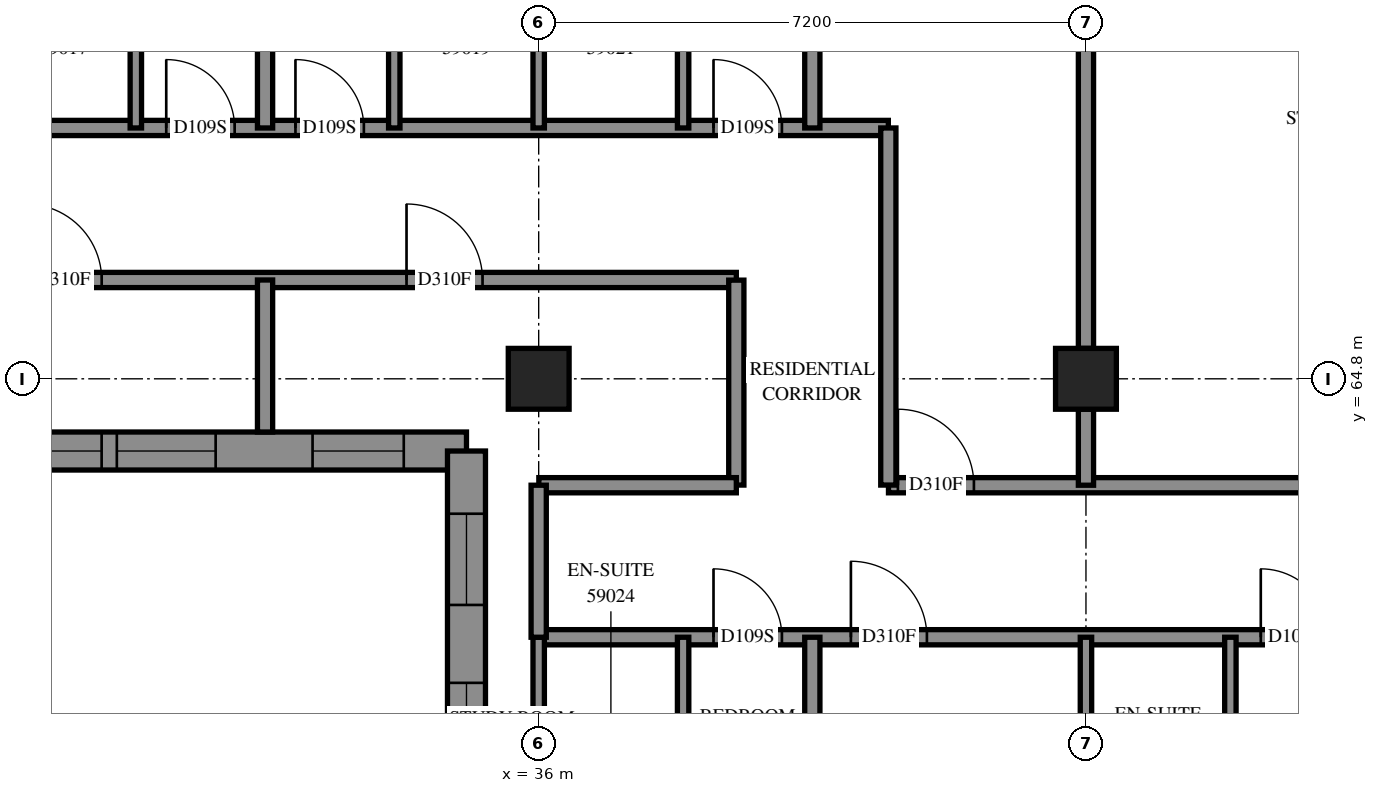
"""IFC4 building model, lengths in metres.
Left out: names, types, materials, properties, quantities, classifications, styles, units other than length and angle.
Written with IfcOpenShell. Run it as: python <this file> out.ifc"""

import sys

from ifc_helpers import new_model, si_unit, direction, frame, frame_2d, origin, origin_2d, place, context, subcontext, project, spatial, polyline, rectangle, outline, extrude, element, fill, save


model = new_model("IFC4")
c1 = context("Model", 3, precision=1e-05, world=origin(), true_north=direction((0.0, 1.0)))
c2 = subcontext(c1, "Body", "Model", "MODEL_VIEW")
j1 = project(units=[si_unit("LENGTHUNIT", "METRE"), si_unit("PLANEANGLEUNIT", "RADIAN")], contexts=[c1])
p1 = place(None, origin())
s1 = spatial("IfcSite", under=j1, at=p1, CompositionType="ELEMENT")
p2 = place(p1, origin())
s2 = spatial("IfcBuilding", under=s1, at=p2, CompositionType="ELEMENT")
p3 = place(p2, frame((0.0, 0.0, 216.8)))
s3 = spatial("IfcBuildingStorey", under=s2, at=p3, CompositionType="ELEMENT", Elevation=216.8)
for number, where, z_axis, x_axis in (
    (1, (36.0, 64.8, 0.0), (0.0, 0.0, 1.0), (1.0, 0.0, 0.0)),
    (2, (43.2, 64.8, 0.0), (0.0, 0.0, 1.0), (1.0, 0.0, 0.0)),
):
    element("IfcColumn", number, at=place(p3, frame(where, z_axis=z_axis, x_axis=x_axis)), inside=s3, PredefinedType="COLUMN", context=c2, shape_type="SweptSolid", body=[
        extrude(rectangle(XDim=0.8, YDim=0.8, at=origin_2d()), origin(), (0.0, 0.0, 1.0), 3.1),
    ])
p4 = place(p3, frame((26.708, 63.85, 0.0), z_axis=(0.0, 0.0, 1.0), x_axis=(1.0, 0.0, 0.0)))
e3 = element("IfcWall", 3, at=p4, inside=s3, PredefinedType="SOLIDWALL", context=c2, shape_type="SweptSolid", body=[
    extrude(outline(polyline([(-0.25, -0.25), (8.092, -0.25), (8.592, 0.25), (0.25, 0.25), (-0.25, -0.25)])), origin(), (0.0, 0.0, 1.0), 3.1),
])
p5 = place(p4, frame((2.242, 0.0, 0.45)))
e4 = element("IfcOpeningElement", 4, at=p5, cuts=e3, PredefinedType="OPENING", context=c2, shape_type="SweptSolid", body=[
    extrude(rectangle(XDim=1.3, YDim=2.5, at=frame_2d((0.65, 1.25))), frame((0.0, 0.26, 0.0), z_axis=(0.0, -1.0, 0.0), x_axis=(1.0, 0.0, 0.0)), (0.0, 0.0, 1.0), 0.52),
])
p6 = place(p4, frame((3.742, 0.0, 0.45)))
e5 = element("IfcOpeningElement", 5, at=p6, cuts=e3, PredefinedType="OPENING", context=c2, shape_type="SweptSolid", body=[
    extrude(rectangle(XDim=1.3, YDim=2.5, at=frame_2d((0.65, 1.25))), frame((0.0, 0.26, 0.0), z_axis=(0.0, -1.0, 0.0), x_axis=(1.0, 0.0, 0.0)), (0.0, 0.0, 1.0), 0.52),
])
p7 = place(p4, frame((0.671, 0.0, 0.45)))
e6 = element("IfcOpeningElement", 6, at=p7, cuts=e3, PredefinedType="OPENING", context=c2, shape_type="SweptSolid", body=[
    extrude(rectangle(XDim=1.2, YDim=2.5, at=frame_2d((0.6, 1.25))), frame((0.0, 0.26, 0.0), z_axis=(0.0, -1.0, 0.0), x_axis=(1.0, 0.0, 0.0)), (0.0, 0.0, 1.0), 0.52),
])
p8 = place(p4, frame((6.317, 0.0, 0.45)))
e7 = element("IfcOpeningElement", 7, at=p8, cuts=e3, PredefinedType="OPENING", context=c2, shape_type="SweptSolid", body=[
    extrude(rectangle(XDim=1.2, YDim=2.5, at=frame_2d((0.6, 1.25))), frame((0.0, 0.26, 0.0), z_axis=(0.0, -1.0, 0.0), x_axis=(1.0, 0.0, 0.0)), (0.0, 0.0, 1.0), 0.52),
])
p9 = place(p3, frame((35.05, 63.85, 0.0), z_axis=(0.0, 0.0, 1.0), x_axis=(0.0, -1.0, 0.0)))
e8 = element("IfcWall", 8, at=p9, inside=s3, PredefinedType="SOLIDWALL", context=c2, shape_type="SweptSolid", body=[
    extrude(outline(polyline([(0.25, -0.25), (7.45, -0.25), (6.95, 0.25), (-0.25, 0.25), (0.25, -0.25)])), origin(), (0.0, 0.0, 1.0), 3.1),
])
p10 = place(p9, frame((3.05, 0.0, 0.45)))
e9 = element("IfcOpeningElement", 9, at=p10, cuts=e8, PredefinedType="OPENING", context=c2, shape_type="SweptSolid", body=[
    extrude(rectangle(XDim=1.3, YDim=2.5, at=frame_2d((0.65, 1.25))), frame((0.0, 0.26, 0.0), z_axis=(0.0, -1.0, 0.0), x_axis=(1.0, 0.0, 0.0)), (0.0, 0.0, 1.0), 0.52),
])
p11 = place(p9, frame((5.0, 0.0, 0.45)))
e10 = element("IfcOpeningElement", 10, at=p11, cuts=e8, PredefinedType="OPENING", context=c2, shape_type="SweptSolid", body=[
    extrude(rectangle(XDim=1.3, YDim=2.5, at=frame_2d((0.65, 1.25))), frame((0.0, 0.26, 0.0), z_axis=(0.0, -1.0, 0.0), x_axis=(1.0, 0.0, 0.0)), (0.0, 0.0, 1.0), 0.52),
])
p12 = place(p9, frame((0.825, 0.0, 0.45)))
e11 = element("IfcOpeningElement", 11, at=p12, cuts=e8, PredefinedType="OPENING", context=c2, shape_type="SweptSolid", body=[
    extrude(rectangle(XDim=1.2, YDim=2.5, at=frame_2d((0.6, 1.25))), frame((0.0, 0.26, 0.0), z_axis=(0.0, -1.0, 0.0), x_axis=(1.0, 0.0, 0.0)), (0.0, 0.0, 1.0), 0.52),
])
p13 = place(p3, frame((36.0, 61.4, 0.0), z_axis=(0.0, 0.0, 1.0), x_axis=(1.0, 0.0, 0.0)))
e12 = element("IfcWall", 12, at=p13, inside=s3, PredefinedType="PARTITIONING", context=c2, shape_type="SweptSolid", body=[
    extrude(rectangle(XDim=17.0, YDim=0.2, at=frame_2d((8.5, 0.0))), origin(), (0.0, 0.0, 1.0), 3.1),
])
p14 = place(p13, frame((2.3, 0.0, 0.0)))
e13 = element("IfcOpeningElement", 13, at=p14, cuts=e12, PredefinedType="OPENING", context=c2, shape_type="SweptSolid", body=[
    extrude(rectangle(XDim=0.9, YDim=2.1, at=frame_2d((0.45, 1.05))), frame((0.0, 0.11, 0.0), z_axis=(0.0, -1.0, 0.0), x_axis=(1.0, 0.0, 0.0)), (0.0, 0.0, 1.0), 0.22),
])
p15 = place(p13, frame((4.107, 0.0, 0.0)))
e14 = element("IfcOpeningElement", 14, at=p15, cuts=e12, PredefinedType="OPENING", context=c2, shape_type="SweptSolid", body=[
    extrude(rectangle(XDim=1.0, YDim=2.1, at=frame_2d((0.5, 1.05))), frame((0.0, 0.11, 0.0), z_axis=(0.0, -1.0, 0.0), x_axis=(1.0, 0.0, 0.0)), (0.0, 0.0, 1.0), 0.22),
])
p16 = place(p13, frame((9.5, 0.0, 0.0)))
e15 = element("IfcOpeningElement", 15, at=p16, cuts=e12, PredefinedType="OPENING", context=c2, shape_type="SweptSolid", body=[
    extrude(rectangle(XDim=0.9, YDim=2.1, at=frame_2d((0.45, 1.05))), frame((0.0, 0.11, 0.0), z_axis=(0.0, -1.0, 0.0), x_axis=(1.0, 0.0, 0.0)), (0.0, 0.0, 1.0), 0.22),
])
p17 = place(p13, frame((11.48, 0.0, 0.0)))
e16 = element("IfcOpeningElement", 16, at=p17, cuts=e12, PredefinedType="OPENING", context=c2, shape_type="SweptSolid", body=[
    extrude(rectangle(XDim=1.0, YDim=2.1, at=frame_2d((0.5, 1.05))), frame((0.0, 0.11, 0.0), z_axis=(0.0, -1.0, 0.0), x_axis=(1.0, 0.0, 0.0)), (0.0, 0.0, 1.0), 0.22),
])
p18 = place(p13, frame((15.805, 0.0, 0.0)))
e17 = element("IfcOpeningElement", 17, at=p18, cuts=e12, PredefinedType="OPENING", context=c2, shape_type="SweptSolid", body=[
    extrude(rectangle(XDim=1.0, YDim=2.1, at=frame_2d((0.5, 1.05))), frame((0.0, 0.11, 0.0), z_axis=(0.0, -1.0, 0.0), x_axis=(1.0, 0.0, 0.0)), (0.0, 0.0, 1.0), 0.22),
])
p19 = place(p3, frame((40.602, 63.4, 0.0), z_axis=(0.0, 0.0, 1.0), x_axis=(1.0, 0.0, 0.0)))
e18 = element("IfcWall", 18, at=p19, inside=s3, PredefinedType="PARTITIONING", context=c2, shape_type="SweptSolid", body=[
    extrude(rectangle(XDim=14.398, YDim=0.2, at=frame_2d((7.199, 0.0))), origin(), (0.0, 0.0, 1.0), 3.1),
])
p20 = place(p19, frame((0.124, 0.0, 0.0)))
e19 = element("IfcOpeningElement", 19, at=p20, cuts=e18, PredefinedType="OPENING", context=c2, shape_type="SweptSolid", body=[
    extrude(rectangle(XDim=1.0, YDim=2.1, at=frame_2d((0.5, 1.05))), frame((0.0, 0.11, 0.0), z_axis=(0.0, -1.0, 0.0), x_axis=(1.0, 0.0, 0.0)), (0.0, 0.0, 1.0), 0.22),
])
p21 = place(p19, frame((6.46, 0.0, 0.0)))
e20 = element("IfcOpeningElement", 20, at=p21, cuts=e18, PredefinedType="OPENING", context=c2, shape_type="SweptSolid", body=[
    extrude(rectangle(XDim=1.0, YDim=2.1, at=frame_2d((0.5, 1.05))), frame((0.0, 0.11, 0.0), z_axis=(0.0, -1.0, 0.0), x_axis=(1.0, 0.0, 0.0)), (0.0, 0.0, 1.0), 0.22),
])
p22 = place(p19, frame((10.198, 0.0, 0.0)))
e21 = element("IfcOpeningElement", 21, at=p22, cuts=e18, PredefinedType="OPENING", context=c2, shape_type="SweptSolid", body=[
    extrude(rectangle(XDim=0.9, YDim=2.1, at=frame_2d((0.45, 1.05))), frame((0.0, 0.11, 0.0), z_axis=(0.0, -1.0, 0.0), x_axis=(1.0, 0.0, 0.0)), (0.0, 0.0, 1.0), 0.22),
])
p23 = place(p3, frame((28.8, 68.1, 0.0), z_axis=(0.0, 0.0, 1.0), x_axis=(1.0, 0.0, 0.0)))
e22 = element("IfcWall", 22, at=p23, inside=s3, PredefinedType="PARTITIONING", context=c2, shape_type="SweptSolid", body=[
    extrude(rectangle(XDim=11.8, YDim=0.2, at=frame_2d((5.9, 0.0))), origin(), (0.0, 0.0, 1.0), 3.1),
])
p24 = place(p23, frame((2.3, 0.0, 0.0)))
e23 = element("IfcOpeningElement", 23, at=p24, cuts=e22, PredefinedType="OPENING", context=c2, shape_type="SweptSolid", body=[
    extrude(rectangle(XDim=0.9, YDim=2.1, at=frame_2d((0.45, 1.05))), frame((0.0, 0.11, 0.0), z_axis=(0.0, -1.0, 0.0), x_axis=(1.0, 0.0, 0.0)), (0.0, 0.0, 1.0), 0.22),
])
p25 = place(p23, frame((4.0, 0.0, 0.0)))
e24 = element("IfcOpeningElement", 24, at=p25, cuts=e22, PredefinedType="OPENING", context=c2, shape_type="SweptSolid", body=[
    extrude(rectangle(XDim=0.9, YDim=2.1, at=frame_2d((0.45, 1.05))), frame((0.0, 0.11, 0.0), z_axis=(0.0, -1.0, 0.0), x_axis=(1.0, 0.0, 0.0)), (0.0, 0.0, 1.0), 0.22),
])
p26 = place(p23, frame((9.5, 0.0, 0.0)))
e25 = element("IfcOpeningElement", 25, at=p26, cuts=e22, PredefinedType="OPENING", context=c2, shape_type="SweptSolid", body=[
    extrude(rectangle(XDim=0.9, YDim=2.1, at=frame_2d((0.45, 1.05))), frame((0.0, 0.11, 0.0), z_axis=(0.0, -1.0, 0.0), x_axis=(1.0, 0.0, 0.0)), (0.0, 0.0, 1.0), 0.22),
])
p27 = place(p3, frame((28.802, 66.1, 0.0), z_axis=(0.0, 0.0, 1.0), x_axis=(1.0, 0.0, 0.0)))
e26 = element("IfcWall", 26, at=p27, inside=s3, PredefinedType="PARTITIONING", context=c2, shape_type="SweptSolid", body=[
    extrude(rectangle(XDim=9.798, YDim=0.2, at=frame_2d((4.899, 0.0))), origin(), (0.0, 0.0, 1.0), 3.1),
])
p28 = place(p27, frame((0.449, 0.0, 0.0)))
e27 = element("IfcOpeningElement", 27, at=p28, cuts=e26, PredefinedType="OPENING", context=c2, shape_type="SweptSolid", body=[
    extrude(rectangle(XDim=1.0, YDim=2.1, at=frame_2d((0.5, 1.05))), frame((0.0, 0.11, 0.0), z_axis=(0.0, -1.0, 0.0), x_axis=(1.0, 0.0, 0.0)), (0.0, 0.0, 1.0), 0.22),
])
p29 = place(p27, frame((5.459, 0.0, 0.0)))
e28 = element("IfcOpeningElement", 28, at=p29, cuts=e26, PredefinedType="OPENING", context=c2, shape_type="SweptSolid", body=[
    extrude(rectangle(XDim=1.0, YDim=2.1, at=frame_2d((0.5, 1.05))), frame((0.0, 0.11, 0.0), z_axis=(0.0, -1.0, 0.0), x_axis=(1.0, 0.0, 0.0)), (0.0, 0.0, 1.0), 0.22),
])
p30 = place(p3, frame((43.2, 65.2, 0.0), z_axis=(0.0, 0.0, 1.0), x_axis=(0.0, 1.0, 0.0)))
e29 = element("IfcWall", 29, at=p30, inside=s3, PredefinedType="PARTITIONING", context=c2, shape_type="SweptSolid", body=[
    extrude(rectangle(XDim=6.4, YDim=0.2, at=frame_2d((3.2, 0.0))), origin(), (0.0, 0.0, 1.0), 3.1),
])
p31 = place(p3, frame((32.4, 68.1, 0.0), z_axis=(0.0, 0.0, 1.0), x_axis=(0.0, 1.0, 0.0)))
e30 = element("IfcWall", 30, at=p31, inside=s3, PredefinedType="PARTITIONING", context=c2, shape_type="SweptSolid", body=[
    extrude(rectangle(XDim=4.893, YDim=0.2, at=frame_2d((2.446, 0.0))), origin(), (0.0, 0.0, 1.0), 3.1),
])
p32 = place(p3, frame((39.6, 68.1, 0.0), z_axis=(0.0, 0.0, 1.0), x_axis=(0.0, 1.0, 0.0)))
e31 = element("IfcWall", 31, at=p32, inside=s3, PredefinedType="PARTITIONING", context=c2, shape_type="SweptSolid", body=[
    extrude(rectangle(XDim=4.826, YDim=0.2, at=frame_2d((2.413, 0.0))), origin(), (0.0, 0.0, 1.0), 3.1),
])
p33 = place(p3, frame((40.6, 63.402, 0.0), z_axis=(0.0, 0.0, 1.0), x_axis=(0.0, 1.0, 0.0)))
e32 = element("IfcWall", 32, at=p33, inside=s3, PredefinedType="PARTITIONING", context=c2, shape_type="SweptSolid", body=[
    extrude(rectangle(XDim=4.698, YDim=0.2, at=frame_2d((2.349, 0.0))), origin(), (0.0, 0.0, 1.0), 3.1),
])
p34 = place(p3, frame((39.6, 56.9, 0.0), z_axis=(0.0, 0.0, 1.0), x_axis=(0.0, 1.0, 0.0)))
e33 = element("IfcWall", 33, at=p34, inside=s3, PredefinedType="PARTITIONING", context=c2, shape_type="SweptSolid", body=[
    extrude(rectangle(XDim=4.5, YDim=0.2, at=frame_2d((2.25, 0.0))), origin(), (0.0, 0.0, 1.0), 3.1),
])
p35 = place(p3, frame((38.6, 63.402, 0.0), z_axis=(0.0, 0.0, 1.0), x_axis=(0.0, 1.0, 0.0)))
e34 = element("IfcWall", 34, at=p35, inside=s3, PredefinedType="PARTITIONING", context=c2, shape_type="SweptSolid", body=[
    extrude(rectangle(XDim=2.696, YDim=0.2, at=frame_2d((1.348, 0.0))), origin(), (0.0, 0.0, 1.0), 3.1),
])
p36 = place(p3, frame((36.002, 63.4, 0.0), z_axis=(0.0, 0.0, 1.0), x_axis=(1.0, 0.0, 0.0)))
e35 = element("IfcWall", 35, at=p36, inside=s3, PredefinedType="PARTITIONING", context=c2, shape_type="SweptSolid", body=[
    extrude(rectangle(XDim=2.598, YDim=0.2, at=frame_2d((1.299, 0.0))), origin(), (0.0, 0.0, 1.0), 3.1),
])
for number, where, z_axis, x_axis in (
    (36, (30.7, 68.1, 0.0), (0.0, 0.0, 1.0), (0.0, 1.0, 0.0)),
    (37, (34.1, 68.1, 0.0), (0.0, 0.0, 1.0), (0.0, 1.0, 0.0)),
    (38, (37.9, 68.1, 0.0), (0.0, 0.0, 1.0), (0.0, 1.0, 0.0)),
    (39, (36.0, 68.1, 0.0), (0.0, 0.0, 1.0), (0.0, 1.0, 0.0)),
    (40, (37.9, 59.0, 0.0), (0.0, 0.0, 1.0), (0.0, 1.0, 0.0)),
):
    element("IfcWall", number, at=place(p3, frame(where, z_axis=z_axis, x_axis=x_axis)), inside=s3, PredefinedType="PARTITIONING", context=c2, shape_type="SweptSolid", body=[
        extrude(rectangle(XDim=2.4, YDim=0.15, at=frame_2d((1.2, 0.0))), origin(), (0.0, 0.0, 1.0), 3.1),
    ])
p37 = place(p3, frame((36.0, 59.0, 0.0), z_axis=(0.0, 0.0, 1.0), x_axis=(0.0, 1.0, 0.0)))
e41 = element("IfcWall", 41, at=p37, inside=s3, PredefinedType="PARTITIONING", context=c2, shape_type="SweptSolid", body=[
    extrude(rectangle(XDim=2.4, YDim=0.15, at=frame_2d((1.2, 0.0))), origin(), (0.0, 0.0, 1.0), 2.6),
])
for number, where, z_axis, x_axis in (
    (42, (45.1, 59.0, 0.0), (0.0, 0.0, 1.0), (0.0, 1.0, 0.0)),
    (43, (43.2, 59.0, 0.0), (0.0, 0.0, 1.0), (0.0, 1.0, 0.0)),
):
    element("IfcWall", number, at=place(p3, frame(where, z_axis=z_axis, x_axis=x_axis)), inside=s3, PredefinedType="PARTITIONING", context=c2, shape_type="SweptSolid", body=[
        extrude(rectangle(XDim=2.4, YDim=0.15, at=frame_2d((1.2, 0.0))), origin(), (0.0, 0.0, 1.0), 3.1),
    ])
p38 = place(p3, frame((36.0, 61.4, 0.0), z_axis=(0.0, 0.0, 1.0), x_axis=(0.0, 1.0, 0.0)))
e44 = element("IfcWall", 44, at=p38, inside=s3, PredefinedType="PARTITIONING", context=c2, shape_type="SweptSolid", body=[
    extrude(rectangle(XDim=2.0, YDim=0.2, at=frame_2d((1.0, 0.0))), origin(), (0.0, 0.0, 1.0), 2.6),
])
p39 = place(p3, frame((32.4, 64.1, 0.0), z_axis=(0.0, 0.0, 1.0), x_axis=(0.0, 1.0, 0.0)))
e45 = element("IfcWall", 45, at=p39, inside=s3, PredefinedType="PARTITIONING", context=c2, shape_type="SweptSolid", body=[
    extrude(rectangle(XDim=2.0, YDim=0.2, at=frame_2d((1.0, 0.0))), origin(), (0.0, 0.0, 1.0), 3.1),
])
p40 = place(p3, frame((43.2, 63.4, 0.0), z_axis=(0.0, 0.0, 1.0), x_axis=(0.0, 1.0, 0.0)))
e46 = element("IfcWall", 46, at=p40, inside=s3, PredefinedType="PARTITIONING", context=c2, shape_type="SweptSolid", body=[
    extrude(rectangle(XDim=1.0, YDim=0.2, at=frame_2d((0.5, 0.0))), origin(), (0.0, 0.0, 1.0), 3.1),
])
p41 = place(p5, origin())
e47 = element("IfcWindow", 47, at=p41, inside=s3, PartitioningType="SINGLE_PANEL", PredefinedType="WINDOW", context=c2, shape_type="SweptSolid", body=[
    extrude(rectangle(XDim=1.3, YDim=2.5, at=frame_2d((0.65, 1.25))), frame((0.0, 0.18, 0.0), z_axis=(0.0, -1.0, 0.0), x_axis=(1.0, 0.0, 0.0)), (0.0, 0.0, 1.0), 0.06),
])
fill(e4, e47)
p42 = place(p6, origin())
e48 = element("IfcWindow", 48, at=p42, inside=s3, PartitioningType="SINGLE_PANEL", PredefinedType="WINDOW", context=c2, shape_type="SweptSolid", body=[
    extrude(rectangle(XDim=1.3, YDim=2.5, at=frame_2d((0.65, 1.25))), frame((0.0, 0.18, 0.0), z_axis=(0.0, -1.0, 0.0), x_axis=(1.0, 0.0, 0.0)), (0.0, 0.0, 1.0), 0.06),
])
fill(e5, e48)
p43 = place(p8, origin())
e49 = element("IfcWindow", 49, at=p43, inside=s3, PartitioningType="SINGLE_PANEL", PredefinedType="WINDOW", context=c2, shape_type="SweptSolid", body=[
    extrude(rectangle(XDim=1.2, YDim=2.5, at=frame_2d((0.6, 1.25))), frame((0.0, 0.18, 0.0), z_axis=(0.0, -1.0, 0.0), x_axis=(1.0, 0.0, 0.0)), (0.0, 0.0, 1.0), 0.06),
])
fill(e7, e49)
p44 = place(p10, origin())
e50 = element("IfcWindow", 50, at=p44, inside=s3, PartitioningType="SINGLE_PANEL", PredefinedType="WINDOW", context=c2, shape_type="SweptSolid", body=[
    extrude(rectangle(XDim=1.3, YDim=2.5, at=frame_2d((0.65, 1.25))), frame((0.0, 0.18, 0.0), z_axis=(0.0, -1.0, 0.0), x_axis=(1.0, 0.0, 0.0)), (0.0, 0.0, 1.0), 0.06),
])
fill(e9, e50)
p45 = place(p12, origin())
e51 = element("IfcWindow", 51, at=p45, inside=s3, PartitioningType="SINGLE_PANEL", PredefinedType="WINDOW", context=c2, shape_type="SweptSolid", body=[
    extrude(rectangle(XDim=1.2, YDim=2.5, at=frame_2d((0.6, 1.25))), frame((0.0, 0.18, 0.0), z_axis=(0.0, -1.0, 0.0), x_axis=(1.0, 0.0, 0.0)), (0.0, 0.0, 1.0), 0.06),
])
fill(e11, e51)
p46 = place(p28, origin())
e52 = element("IfcDoor", 52, at=p46, inside=s3, OperationType="SINGLE_SWING_LEFT", PredefinedType="DOOR", context=c2, shape_type="SweptSolid", body=[
    extrude(rectangle(XDim=1.0, YDim=2.1, at=frame_2d((0.5, 1.05))), frame((0.0, 0.025, 0.0), z_axis=(0.0, -1.0, 0.0), x_axis=(1.0, 0.0, 0.0)), (0.0, 0.0, 1.0), 0.05),
])
fill(e27, e52)
p47 = place(p24, origin())
e53 = element("IfcDoor", 53, at=p47, inside=s3, OperationType="SINGLE_SWING_RIGHT", PredefinedType="DOOR", context=c2, shape_type="SweptSolid", body=[
    extrude(rectangle(XDim=0.9, YDim=2.1, at=frame_2d((0.45, 1.05))), frame((0.0, 0.025, 0.0), z_axis=(0.0, -1.0, 0.0), x_axis=(1.0, 0.0, 0.0)), (0.0, 0.0, 1.0), 0.05),
])
fill(e23, e53)
p48 = place(p25, origin())
e54 = element("IfcDoor", 54, at=p48, inside=s3, OperationType="SINGLE_SWING_LEFT", PredefinedType="DOOR", context=c2, shape_type="SweptSolid", body=[
    extrude(rectangle(XDim=0.9, YDim=2.1, at=frame_2d((0.45, 1.05))), frame((0.0, 0.025, 0.0), z_axis=(0.0, -1.0, 0.0), x_axis=(1.0, 0.0, 0.0)), (0.0, 0.0, 1.0), 0.05),
])
fill(e24, e54)
p49 = place(p26, origin())
e55 = element("IfcDoor", 55, at=p49, inside=s3, OperationType="SINGLE_SWING_RIGHT", PredefinedType="DOOR", context=c2, shape_type="SweptSolid", body=[
    extrude(rectangle(XDim=0.9, YDim=2.1, at=frame_2d((0.45, 1.05))), frame((0.0, 0.025, 0.0), z_axis=(0.0, -1.0, 0.0), x_axis=(1.0, 0.0, 0.0)), (0.0, 0.0, 1.0), 0.05),
])
fill(e25, e55)
p50 = place(p29, origin())
e56 = element("IfcDoor", 56, at=p50, inside=s3, OperationType="SINGLE_SWING_RIGHT", PredefinedType="DOOR", context=c2, shape_type="SweptSolid", body=[
    extrude(rectangle(XDim=1.0, YDim=2.1, at=frame_2d((0.5, 1.05))), frame((0.0, 0.025, 0.0), z_axis=(0.0, -1.0, 0.0), x_axis=(1.0, 0.0, 0.0)), (0.0, 0.0, 1.0), 0.05),
])
fill(e28, e56)
p51 = place(p14, origin())
e57 = element("IfcDoor", 57, at=p51, inside=s3, OperationType="SINGLE_SWING_LEFT", PredefinedType="DOOR", context=c2, shape_type="SweptSolid", body=[
    extrude(rectangle(XDim=0.9, YDim=2.1, at=frame_2d((0.45, 1.05))), frame((0.0, 0.025, 0.0), z_axis=(0.0, -1.0, 0.0), x_axis=(1.0, 0.0, 0.0)), (0.0, 0.0, 1.0), 0.05),
])
fill(e13, e57)
p52 = place(p20, origin())
e58 = element("IfcDoor", 58, at=p52, inside=s3, OperationType="SINGLE_SWING_LEFT", PredefinedType="DOOR", context=c2, shape_type="SweptSolid", body=[
    extrude(rectangle(XDim=1.0, YDim=2.1, at=frame_2d((0.5, 1.05))), frame((0.0, 0.025, 0.0), z_axis=(0.0, -1.0, 0.0), x_axis=(1.0, 0.0, 0.0)), (0.0, 0.0, 1.0), 0.05),
])
fill(e19, e58)
p53 = place(p15, origin())
e59 = element("IfcDoor", 59, at=p53, inside=s3, OperationType="SINGLE_SWING_RIGHT", PredefinedType="DOOR", context=c2, shape_type="SweptSolid", body=[
    extrude(rectangle(XDim=1.0, YDim=2.1, at=frame_2d((0.5, 1.05))), frame((0.0, 0.025, 0.0), z_axis=(0.0, -1.0, 0.0), x_axis=(1.0, 0.0, 0.0)), (0.0, 0.0, 1.0), 0.05),
])
fill(e14, e59)
p54 = place(p16, origin())
e60 = element("IfcDoor", 60, at=p54, inside=s3, OperationType="SINGLE_SWING_LEFT", PredefinedType="DOOR", context=c2, shape_type="SweptSolid", body=[
    extrude(rectangle(XDim=0.9, YDim=2.1, at=frame_2d((0.45, 1.05))), frame((0.0, 0.025, 0.0), z_axis=(0.0, -1.0, 0.0), x_axis=(1.0, 0.0, 0.0)), (0.0, 0.0, 1.0), 0.05),
])
fill(e15, e60)
save(model, sys.argv[1])
